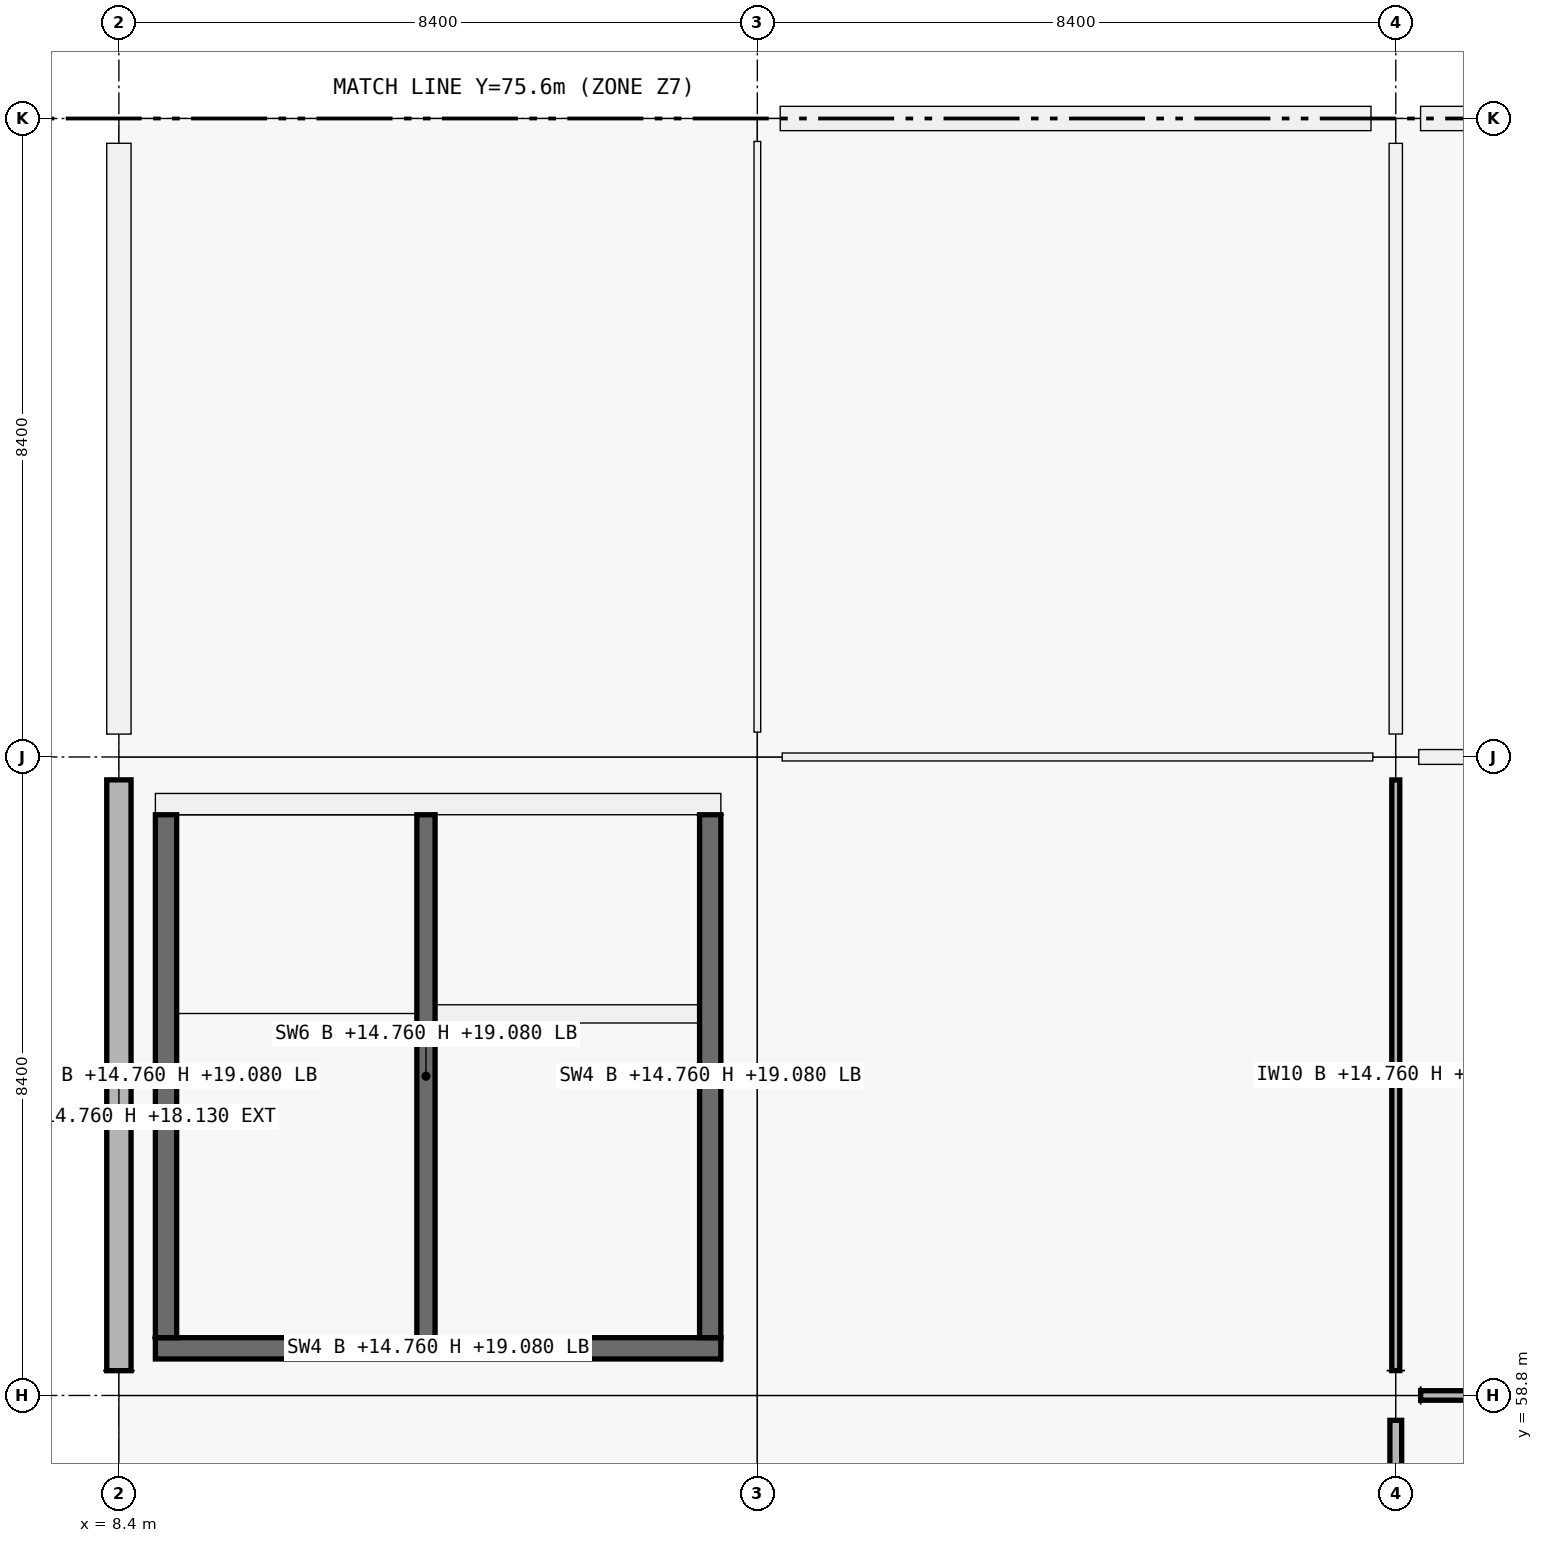
"""IFC4 building model, lengths in metres.
Left out: names, types, materials, properties, quantities, classifications, styles, units other than length and angle.
Written with IfcOpenShell. Run it as: python <this file> out.ifc"""

import sys

from ifc_helpers import new_model, si_unit, direction, frame, frame_2d, origin, origin_2d, place, context, subcontext, project, spatial, rectangle, extrude, element, fill, save


model = new_model("IFC4")
c1 = context("Model", 3, precision=1e-05, world=origin(), true_north=direction((0.0, 1.0)))
c2 = subcontext(c1, "Body", "Model", "MODEL_VIEW")
j1 = project(units=[si_unit("LENGTHUNIT", "METRE"), si_unit("PLANEANGLEUNIT", "RADIAN")], contexts=[c1])
p1 = place(None, origin())
s1 = spatial("IfcSite", under=j1, at=p1, CompositionType="ELEMENT")
p2 = place(p1, origin())
s2 = spatial("IfcBuilding", under=s1, at=p2, CompositionType="ELEMENT")
p3 = place(p2, frame((0.0, 0.0, 14.76)))
s3 = spatial("IfcBuildingStorey", under=s2, at=p3, CompositionType="ELEMENT", Elevation=14.76)
p4 = place(p3, frame((8.4, 58.8, 0.0), z_axis=(0.0, 0.0, 1.0), x_axis=(1.0, 0.0, 0.0)))
e1 = element("IfcColumn", 1, at=p4, inside=s3, PredefinedType="COLUMN", context=c2, shape_type="SweptSolid", body=[
    extrude(rectangle(XDim=0.65, YDim=0.65, at=origin_2d()), origin(), (0.0, 0.0, 1.0), 4.32),
])
p5 = place(p3, frame((8.4, 67.2, 0.0), z_axis=(0.0, 0.0, 1.0), x_axis=(1.0, 0.0, 0.0)))
e2 = element("IfcColumn", 2, at=p5, inside=s3, PredefinedType="COLUMN", context=c2, shape_type="SweptSolid", body=[
    extrude(rectangle(XDim=0.6, YDim=0.6, at=origin_2d()), origin(), (0.0, 0.0, 1.0), 4.32),
])
p6 = place(p3, frame((8.4, 75.6, 0.0), z_axis=(0.0, 0.0, 1.0), x_axis=(1.0, 0.0, 0.0)))
e3 = element("IfcColumn", 3, at=p6, inside=s3, PredefinedType="COLUMN", context=c2, shape_type="SweptSolid", body=[
    extrude(rectangle(XDim=0.65, YDim=0.65, at=origin_2d()), origin(), (0.0, 0.0, 1.0), 4.32),
])
p7 = place(p3, frame((16.8, 58.8, 0.0), z_axis=(0.0, 0.0, 1.0), x_axis=(1.0, 0.0, 0.0)))
e4 = element("IfcColumn", 4, at=p7, inside=s3, PredefinedType="COLUMN", context=c2, shape_type="SweptSolid", body=[
    extrude(rectangle(XDim=0.6, YDim=0.6, at=origin_2d()), origin(), (0.0, 0.0, 1.0), 4.32),
])
p8 = place(p3, frame((16.8, 67.2, 0.0), z_axis=(0.0, 0.0, 1.0), x_axis=(1.0, 0.0, 0.0)))
e5 = element("IfcColumn", 5, at=p8, inside=s3, PredefinedType="COLUMN", context=c2, shape_type="SweptSolid", body=[
    extrude(rectangle(XDim=0.65, YDim=0.65, at=origin_2d()), origin(), (0.0, 0.0, 1.0), 4.32),
])
p9 = place(p3, frame((16.8, 75.6, 0.0), z_axis=(0.0, 0.0, 1.0), x_axis=(1.0, 0.0, 0.0)))
e6 = element("IfcColumn", 6, at=p9, inside=s3, PredefinedType="COLUMN", context=c2, shape_type="SweptSolid", body=[
    extrude(rectangle(XDim=0.6, YDim=0.6, at=origin_2d()), origin(), (0.0, 0.0, 1.0), 4.32),
])
p10 = place(p3, frame((25.2, 58.8, 0.0), z_axis=(0.0, 0.0, 1.0), x_axis=(1.0, 0.0, 0.0)))
e7 = element("IfcColumn", 7, at=p10, inside=s3, PredefinedType="COLUMN", context=c2, shape_type="SweptSolid", body=[
    extrude(rectangle(XDim=0.65, YDim=0.65, at=origin_2d()), origin(), (0.0, 0.0, 1.0), 4.32),
])
p11 = place(p3, frame((25.2, 67.2, 0.0), z_axis=(0.0, 0.0, 1.0), x_axis=(1.0, 0.0, 0.0)))
e8 = element("IfcColumn", 8, at=p11, inside=s3, PredefinedType="COLUMN", context=c2, shape_type="SweptSolid", body=[
    extrude(rectangle(XDim=0.6, YDim=0.6, at=origin_2d()), origin(), (0.0, 0.0, 1.0), 4.32),
])
p12 = place(p3, frame((25.2, 75.6, 0.0), z_axis=(0.0, 0.0, 1.0), x_axis=(1.0, 0.0, 0.0)))
e9 = element("IfcColumn", 9, at=p12, inside=s3, PredefinedType="COLUMN", context=c2, shape_type="SweptSolid", body=[
    extrude(rectangle(XDim=0.65, YDim=0.65, at=origin_2d()), origin(), (0.0, 0.0, 1.0), 4.32),
])
p13 = place(p3, frame((8.4, 59.126, 0.0), z_axis=(0.0, 0.0, 1.0), x_axis=(0.0, 1.0, 0.0)))
e10 = element("IfcWall", 10, at=p13, inside=s3, PredefinedType="SOLIDWALL", context=c2, shape_type="SweptSolid", body=[
    extrude(rectangle(XDim=7.773, YDim=0.32, at=frame_2d((3.886, 0.0))), origin(), (0.0, 0.0, 1.0), 3.37),
])
p14 = place(p3, frame((8.4, 67.501, 0.0), z_axis=(0.0, 0.0, 1.0), x_axis=(0.0, 1.0, 0.0)))
e11 = element("IfcWall", 11, at=p14, inside=s3, PredefinedType="SOLIDWALL", context=c2, shape_type="SweptSolid", body=[
    extrude(rectangle(XDim=7.773, YDim=0.32, at=frame_2d((3.886, 0.0))), origin(), (0.0, 0.0, 1.0), 3.37),
])
p15 = place(p14, frame((2.786, 0.0, 0.9)))
e12 = element("IfcOpeningElement", 12, at=p15, cuts=e11, PredefinedType="OPENING", context=c2, shape_type="SweptSolid", body=[
    extrude(rectangle(XDim=2.2, YDim=1.35, at=frame_2d((1.1, 0.675))), frame((0.0, 0.16, 0.0), z_axis=(0.0, -1.0, 0.0), x_axis=(1.0, 0.0, 0.0)), (0.0, 0.0, 1.0), 0.32),
])
p16 = place(p3, frame((17.101, 75.6, 0.0), z_axis=(0.0, 0.0, 1.0), x_axis=(1.0, 0.0, 0.0)))
e13 = element("IfcWall", 13, at=p16, inside=s3, PredefinedType="SOLIDWALL", context=c2, shape_type="SweptSolid", body=[
    extrude(rectangle(XDim=7.773, YDim=0.32, at=frame_2d((3.886, 0.0))), origin(), (0.0, 0.0, 1.0), 3.37),
])
p17 = place(p16, frame((2.986, 0.0, 0.9)))
e14 = element("IfcOpeningElement", 14, at=p17, cuts=e13, PredefinedType="OPENING", context=c2, shape_type="SweptSolid", body=[
    extrude(rectangle(XDim=1.8, YDim=1.35, at=frame_2d((0.9, 0.675))), frame((0.0, 0.16, 0.0), z_axis=(0.0, -1.0, 0.0), x_axis=(1.0, 0.0, 0.0)), (0.0, 0.0, 1.0), 0.32),
])
p18 = place(p3, frame((25.526, 75.6, 0.0), z_axis=(0.0, 0.0, 1.0), x_axis=(1.0, 0.0, 0.0)))
e15 = element("IfcWall", 15, at=p18, inside=s3, PredefinedType="SOLIDWALL", context=c2, shape_type="SweptSolid", body=[
    extrude(rectangle(XDim=7.773, YDim=0.32, at=frame_2d((3.887, 0.0))), origin(), (0.0, 0.0, 1.0), 3.37),
])
p19 = place(p18, frame((2.636, 0.0, 0.9)))
e16 = element("IfcOpeningElement", 16, at=p19, cuts=e15, PredefinedType="OPENING", context=c2, shape_type="SweptSolid", body=[
    extrude(rectangle(XDim=2.5, YDim=1.65, at=frame_2d((1.25, 0.825))), frame((0.0, 0.16, 0.0), z_axis=(0.0, -1.0, 0.0), x_axis=(1.0, 0.0, 0.0)), (0.0, 0.0, 1.0), 0.32),
])
p20 = place(p3, frame((16.32, 59.42, 0.0), z_axis=(0.0, 0.0, 1.0), x_axis=(-1.0, 0.0, 0.0)))
e17 = element("IfcWall", 17, at=p20, inside=s3, PredefinedType="SHEAR", context=c2, shape_type="SweptSolid", body=[
    extrude(rectangle(XDim=7.44, YDim=0.28, at=frame_2d((3.72, 0.0))), origin(), (0.0, 0.0, 1.0), 4.32),
])
p21 = place(p20, frame((1.28, 0.0, 0.0)))
e18 = element("IfcOpeningElement", 18, at=p21, cuts=e17, PredefinedType="OPENING", context=c2, shape_type="SweptSolid", body=[
    extrude(rectangle(XDim=1.5, YDim=2.15, at=frame_2d((0.75, 1.075))), frame((0.0, 0.14, 0.0), z_axis=(0.0, -1.0, 0.0), x_axis=(1.0, 0.0, 0.0)), (0.0, 0.0, 1.0), 0.28),
])
p22 = place(p3, frame((9.02, 59.56, 0.0), z_axis=(0.0, 0.0, 1.0), x_axis=(0.0, 1.0, 0.0)))
e19 = element("IfcWall", 19, at=p22, inside=s3, PredefinedType="SHEAR", context=c2, shape_type="SweptSolid", body=[
    extrude(rectangle(XDim=6.88, YDim=0.28, at=frame_2d((3.44, 0.0))), origin(), (0.0, 0.0, 1.0), 4.32),
])
p23 = place(p3, frame((8.88, 66.58, 0.0), z_axis=(0.0, 0.0, 1.0), x_axis=(1.0, 0.0, 0.0)))
e20 = element("IfcWall", 20, at=p23, inside=s3, PredefinedType="SHEAR", context=c2, shape_type="SweptSolid", body=[
    extrude(rectangle(XDim=7.44, YDim=0.28, at=frame_2d((3.72, 0.0))), origin(), (0.0, 0.0, 1.0), 4.32),
])
p24 = place(p3, frame((16.18, 66.44, 0.0), z_axis=(0.0, 0.0, 1.0), x_axis=(0.0, -1.0, 0.0)))
e21 = element("IfcWall", 21, at=p24, inside=s3, PredefinedType="SHEAR", context=c2, shape_type="SweptSolid", body=[
    extrude(rectangle(XDim=6.88, YDim=0.28, at=frame_2d((3.44, 0.0))), origin(), (0.0, 0.0, 1.0), 4.32),
])
p25 = place(p3, frame((12.44, 59.56, 0.0), z_axis=(0.0, 0.0, 1.0), x_axis=(0.0, 1.0, 0.0)))
e22 = element("IfcWall", 22, at=p25, inside=s3, PredefinedType="SHEAR", context=c2, shape_type="SweptSolid", body=[
    extrude(rectangle(XDim=6.88, YDim=0.24, at=frame_2d((3.44, 0.0))), origin(), (0.0, 0.0, 1.0), 4.32),
])
p26 = place(p25, frame((0.12, 0.0, 0.0)))
e23 = element("IfcOpeningElement", 23, at=p26, cuts=e22, PredefinedType="OPENING", context=c2, shape_type="SweptSolid", body=[
    extrude(rectangle(XDim=1.0, YDim=2.15, at=frame_2d((0.5, 1.075))), frame((0.0, 0.12, 0.0), z_axis=(0.0, -1.0, 0.0), x_axis=(1.0, 0.0, 0.0)), (0.0, 0.0, 1.0), 0.24),
])
p27 = place(p3, frame((12.56, 63.82, 0.0), z_axis=(0.0, 0.0, 1.0), x_axis=(1.0, 0.0, 0.0)))
e24 = element("IfcWall", 24, at=p27, inside=s3, PredefinedType="SHEAR", context=c2, shape_type="SweptSolid", body=[
    extrude(rectangle(XDim=3.48, YDim=0.24, at=frame_2d((1.74, 0.0))), origin(), (0.0, 0.0, 1.0), 4.32),
])
p28 = place(p27, frame((1.19, 0.0, 0.0)))
e25 = element("IfcOpeningElement", 25, at=p28, cuts=e24, PredefinedType="OPENING", context=c2, shape_type="SweptSolid", body=[
    extrude(rectangle(XDim=1.1, YDim=2.15, at=frame_2d((0.55, 1.075))), frame((0.0, 0.12, 0.0), z_axis=(0.0, -1.0, 0.0), x_axis=(1.0, 0.0, 0.0)), (0.0, 0.0, 1.0), 0.24),
])
p29 = place(p3, frame((17.127, 67.2, 0.0), z_axis=(0.0, 0.0, 1.0), x_axis=(1.0, 0.0, 0.0)))
e26 = element("IfcWall", 26, at=p29, inside=s3, PredefinedType="PARTITIONING", context=c2, shape_type="SweptSolid", body=[
    extrude(rectangle(XDim=7.771, YDim=0.105, at=frame_2d((3.885, 0.0))), origin(), (0.0, 0.0, 1.0), 3.19),
])
p30 = place(p29, frame((3.356, 0.0, 0.0)))
e27 = element("IfcOpeningElement", 27, at=p30, cuts=e26, PredefinedType="OPENING", context=c2, shape_type="SweptSolid", body=[
    extrude(rectangle(XDim=1.06, YDim=2.25, at=frame_2d((0.53, 1.125))), frame((0.0, 0.052, 0.0), z_axis=(0.0, -1.0, 0.0), x_axis=(1.0, 0.0, 0.0)), (0.0, 0.0, 1.0), 0.105),
])
p31 = place(p3, frame((25.527, 58.8, 0.0), z_axis=(0.0, 0.0, 1.0), x_axis=(1.0, 0.0, 0.0)))
e28 = element("IfcWall", 28, at=p31, inside=s3, PredefinedType="PARTITIONING", context=c2, shape_type="SweptSolid", body=[
    extrude(rectangle(XDim=7.771, YDim=0.125, at=frame_2d((3.885, 0.0))), origin(), (0.0, 0.0, 1.0), 3.19),
])
p32 = place(p31, frame((3.401, 0.0, 0.0)))
e29 = element("IfcOpeningElement", 29, at=p32, cuts=e28, PredefinedType="OPENING", context=c2, shape_type="SweptSolid", body=[
    extrude(rectangle(XDim=0.97, YDim=2.12, at=frame_2d((0.485, 1.06))), frame((0.0, 0.062, 0.0), z_axis=(0.0, -1.0, 0.0), x_axis=(1.0, 0.0, 0.0)), (0.0, 0.0, 1.0), 0.125),
])
p33 = place(p3, frame((25.502, 67.2, 0.0), z_axis=(0.0, 0.0, 1.0), x_axis=(1.0, 0.0, 0.0)))
e30 = element("IfcWall", 30, at=p33, inside=s3, PredefinedType="PARTITIONING", context=c2, shape_type="SweptSolid", body=[
    extrude(rectangle(XDim=7.771, YDim=0.195, at=frame_2d((3.885, 0.0))), origin(), (0.0, 0.0, 1.0), 3.19),
])
p34 = place(p33, frame((3.401, 0.0, 0.0)))
e31 = element("IfcOpeningElement", 31, at=p34, cuts=e30, PredefinedType="OPENING", context=c2, shape_type="SweptSolid", body=[
    extrude(rectangle(XDim=0.97, YDim=2.12, at=frame_2d((0.485, 1.06))), frame((0.0, 0.098, 0.0), z_axis=(0.0, -1.0, 0.0), x_axis=(1.0, 0.0, 0.0)), (0.0, 0.0, 1.0), 0.195),
])
p35 = place(p3, frame((16.8, 67.527, 0.0), z_axis=(0.0, 0.0, 1.0), x_axis=(0.0, 1.0, 0.0)))
e32 = element("IfcWall", 32, at=p35, inside=s3, PredefinedType="PARTITIONING", context=c2, shape_type="SweptSolid", body=[
    extrude(rectangle(XDim=7.771, YDim=0.088, at=frame_2d((3.885, 0.0))), origin(), (0.0, 0.0, 1.0), 3.19),
])
p36 = place(p35, frame((3.356, 0.0, 0.0)))
e33 = element("IfcOpeningElement", 33, at=p36, cuts=e32, PredefinedType="OPENING", context=c2, shape_type="SweptSolid", body=[
    extrude(rectangle(XDim=1.06, YDim=2.25, at=frame_2d((0.53, 1.125))), frame((0.0, 0.044, 0.0), z_axis=(0.0, -1.0, 0.0), x_axis=(1.0, 0.0, 0.0)), (0.0, 0.0, 1.0), 0.088),
])
p37 = place(p3, frame((25.2, 50.702, 0.0), z_axis=(0.0, 0.0, 1.0), x_axis=(0.0, 1.0, 0.0)))
e34 = element("IfcWall", 34, at=p37, inside=s3, PredefinedType="PARTITIONING", context=c2, shape_type="SweptSolid", body=[
    extrude(rectangle(XDim=7.771, YDim=0.155, at=frame_2d((3.885, 0.0))), origin(), (0.0, 0.0, 1.0), 3.19),
])
p38 = place(p37, frame((3.385, 0.0, 0.0)))
e35 = element("IfcOpeningElement", 35, at=p38, cuts=e34, PredefinedType="OPENING", context=c2, shape_type="SweptSolid", body=[
    extrude(rectangle(XDim=1.0, YDim=2.2, at=frame_2d((0.5, 1.1))), frame((0.0, 0.078, 0.0), z_axis=(0.0, -1.0, 0.0), x_axis=(1.0, 0.0, 0.0)), (0.0, 0.0, 1.0), 0.155),
])
p39 = place(p3, frame((25.2, 59.127, 0.0), z_axis=(0.0, 0.0, 1.0), x_axis=(0.0, 1.0, 0.0)))
e36 = element("IfcWall", 36, at=p39, inside=s3, PredefinedType="PARTITIONING", context=c2, shape_type="SweptSolid", body=[
    extrude(rectangle(XDim=7.771, YDim=0.105, at=frame_2d((3.885, 0.0))), origin(), (0.0, 0.0, 1.0), 3.19),
])
p40 = place(p39, frame((3.396, 0.0, 0.0)))
e37 = element("IfcOpeningElement", 37, at=p40, cuts=e36, PredefinedType="OPENING", context=c2, shape_type="SweptSolid", body=[
    extrude(rectangle(XDim=0.98, YDim=2.18, at=frame_2d((0.49, 1.09))), frame((0.0, 0.052, 0.0), z_axis=(0.0, -1.0, 0.0), x_axis=(1.0, 0.0, 0.0)), (0.0, 0.0, 1.0), 0.105),
])
p41 = place(p3, frame((25.2, 67.502, 0.0), z_axis=(0.0, 0.0, 1.0), x_axis=(0.0, 1.0, 0.0)))
e38 = element("IfcWall", 38, at=p41, inside=s3, PredefinedType="PARTITIONING", context=c2, shape_type="SweptSolid", body=[
    extrude(rectangle(XDim=7.771, YDim=0.175, at=frame_2d((3.885, 0.0))), origin(), (0.0, 0.0, 1.0), 3.19),
])
p42 = place(p41, frame((3.356, 0.0, 0.0)))
e39 = element("IfcOpeningElement", 39, at=p42, cuts=e38, PredefinedType="OPENING", context=c2, shape_type="SweptSolid", body=[
    extrude(rectangle(XDim=1.06, YDim=2.25, at=frame_2d((0.53, 1.125))), frame((0.0, 0.087, 0.0), z_axis=(0.0, -1.0, 0.0), x_axis=(1.0, 0.0, 0.0)), (0.0, 0.0, 1.0), 0.175),
])
p43 = place(p15, origin())
e40 = element("IfcWindow", 40, at=p43, inside=s3, PartitioningType="SINGLE_PANEL", PredefinedType="WINDOW", context=c2, shape_type="SweptSolid", body=[
    extrude(rectangle(XDim=2.2, YDim=1.35, at=frame_2d((1.1, 0.675))), frame((0.0, 0.03, 0.0), z_axis=(0.0, -1.0, 0.0), x_axis=(1.0, 0.0, 0.0)), (0.0, 0.0, 1.0), 0.06),
])
fill(e12, e40)
p44 = place(p17, origin())
e41 = element("IfcWindow", 41, at=p44, inside=s3, PartitioningType="SINGLE_PANEL", PredefinedType="WINDOW", context=c2, shape_type="SweptSolid", body=[
    extrude(rectangle(XDim=1.8, YDim=1.35, at=frame_2d((0.9, 0.675))), frame((0.0, 0.03, 0.0), z_axis=(0.0, -1.0, 0.0), x_axis=(1.0, 0.0, 0.0)), (0.0, 0.0, 1.0), 0.06),
])
fill(e14, e41)
p45 = place(p26, origin())
e42 = element("IfcDoor", 42, at=p45, inside=s3, OperationType="SINGLE_SWING_LEFT", PredefinedType="DOOR", context=c2, shape_type="SweptSolid", body=[
    extrude(rectangle(XDim=1.0, YDim=2.15, at=frame_2d((0.5, 1.075))), frame((0.0, 0.025, 0.0), z_axis=(0.0, -1.0, 0.0), x_axis=(1.0, 0.0, 0.0)), (0.0, 0.0, 1.0), 0.05),
])
fill(e23, e42)
p46 = place(p21, origin())
e43 = element("IfcDoor", 43, at=p46, inside=s3, OperationType="DOUBLE_DOOR_SINGLE_SWING", PredefinedType="DOOR", context=c2, shape_type="SweptSolid", body=[
    extrude(rectangle(XDim=1.5, YDim=2.15, at=frame_2d((0.75, 1.075))), frame((0.0, 0.025, 0.0), z_axis=(0.0, -1.0, 0.0), x_axis=(1.0, 0.0, 0.0)), (0.0, 0.0, 1.0), 0.05),
])
fill(e18, e43)
p47 = place(p28, origin())
e44 = element("IfcDoor", 44, at=p47, inside=s3, OperationType="DOUBLE_DOOR_SLIDING", PredefinedType="DOOR", context=c2, shape_type="SweptSolid", body=[
    extrude(rectangle(XDim=1.1, YDim=2.15, at=frame_2d((0.55, 1.075))), frame((0.0, 0.025, 0.0), z_axis=(0.0, -1.0, 0.0), x_axis=(1.0, 0.0, 0.0)), (0.0, 0.0, 1.0), 0.05),
])
fill(e25, e44)
p48 = place(p30, origin())
e45 = element("IfcDoor", 45, at=p48, inside=s3, OperationType="SINGLE_SWING_LEFT", PredefinedType="DOOR", context=c2, shape_type="SweptSolid", body=[
    extrude(rectangle(XDim=1.06, YDim=2.25, at=frame_2d((0.53, 1.125))), frame((0.0, 0.025, 0.0), z_axis=(0.0, -1.0, 0.0), x_axis=(1.0, 0.0, 0.0)), (0.0, 0.0, 1.0), 0.05),
])
fill(e27, e45)
p49 = place(p40, origin())
e46 = element("IfcDoor", 46, at=p49, inside=s3, OperationType="SINGLE_SWING_RIGHT", PredefinedType="DOOR", context=c2, shape_type="SweptSolid", body=[
    extrude(rectangle(XDim=0.98, YDim=2.18, at=frame_2d((0.49, 1.09))), frame((0.0, 0.025, 0.0), z_axis=(0.0, -1.0, 0.0), x_axis=(1.0, 0.0, 0.0)), (0.0, 0.0, 1.0), 0.05),
])
fill(e37, e46)
p50 = place(p36, origin())
e47 = element("IfcDoor", 47, at=p50, inside=s3, OperationType="SINGLE_SWING_LEFT", PredefinedType="DOOR", context=c2, shape_type="SweptSolid", body=[
    extrude(rectangle(XDim=1.06, YDim=2.25, at=frame_2d((0.53, 1.125))), frame((0.0, 0.025, 0.0), z_axis=(0.0, -1.0, 0.0), x_axis=(1.0, 0.0, 0.0)), (0.0, 0.0, 1.0), 0.05),
])
fill(e33, e47)
p51 = place(p42, origin())
e48 = element("IfcDoor", 48, at=p51, inside=s3, OperationType="SINGLE_SWING_RIGHT", PredefinedType="DOOR", context=c2, shape_type="SweptSolid", body=[
    extrude(rectangle(XDim=1.06, YDim=2.25, at=frame_2d((0.53, 1.125))), frame((0.0, 0.025, 0.0), z_axis=(0.0, -1.0, 0.0), x_axis=(1.0, 0.0, 0.0)), (0.0, 0.0, 1.0), 0.05),
])
fill(e39, e48)
save(model, sys.argv[1])
